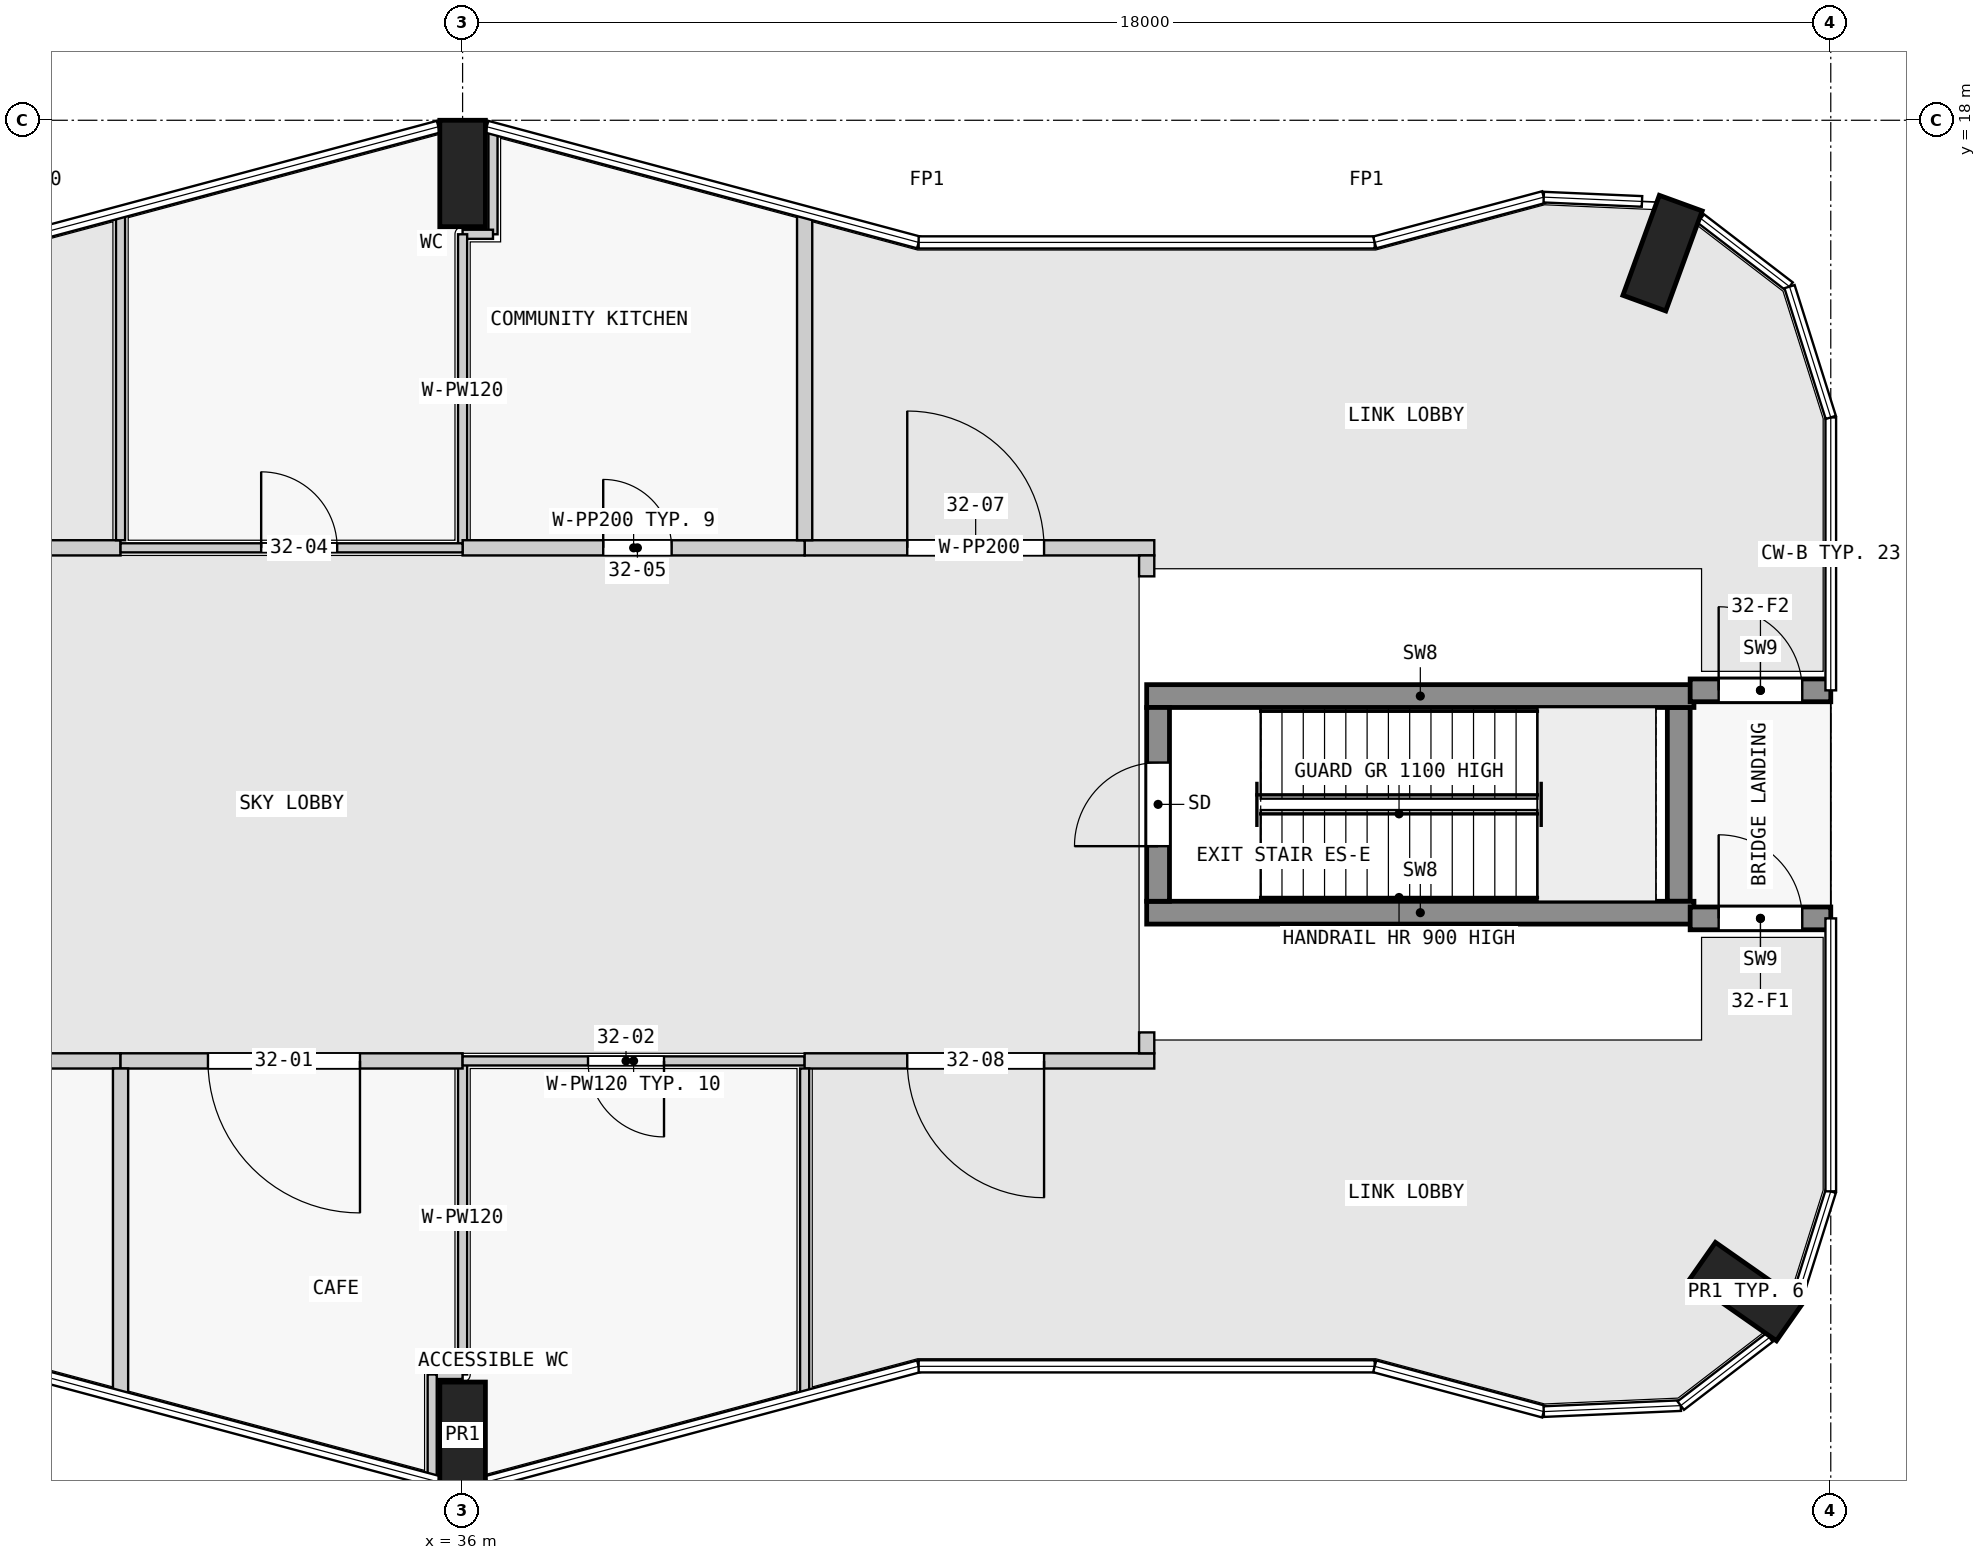
"""IFC4 building model, lengths in metres.
Left out: names, types, materials, properties, quantities, classifications, styles, units other than length and angle.
Written with IfcOpenShell. Run it as: python <this file> out.ifc"""

import sys

from ifc_helpers import new_model, si_unit, direction, frame, frame_2d, origin, origin_2d, place, context, subcontext, project, spatial, rectangle, extrude, element, fill, save


model = new_model("IFC4")
c1 = context("Model", 3, precision=1e-05, world=origin(), true_north=direction((0.0, 1.0)))
c2 = subcontext(c1, "Body", "Model", "MODEL_VIEW")
j1 = project(units=[si_unit("LENGTHUNIT", "METRE"), si_unit("PLANEANGLEUNIT", "RADIAN")], contexts=[c1])
p1 = place(None, origin())
s1 = spatial("IfcSite", under=j1, at=p1, CompositionType="ELEMENT")
p2 = place(p1, origin())
s2 = spatial("IfcBuilding", under=s1, at=p2, CompositionType="ELEMENT")
p3 = place(p2, frame((0.0, 0.0, 123.8)))
s3 = spatial("IfcBuildingStorey", under=s2, at=p3, CompositionType="ELEMENT", Elevation=123.8)
for number, where, z_axis, x_axis in (
    (1, (36.0, 0.7, 0.0), (0.0, 0.0, 1.0), (1.0, 0.0, 0.0)),
    (2, (52.884, 2.59, 0.0), (0.0, 0.0, 1.0), (0.574, 0.819, 0.0)),
    (3, (51.787, 16.252, 0.0), (0.0, 0.0, 1.0), (-0.94, 0.342, 0.0)),
    (4, (36.0, 17.3, 0.0), (0.0, 0.0, 1.0), (1.0, 0.0, 0.0)),
):
    element("IfcColumn", number, at=place(p3, frame(where, z_axis=z_axis, x_axis=x_axis)), inside=s3, PredefinedType="COLUMN", context=c2, shape_type="SweptSolid", body=[
        extrude(rectangle(XDim=0.6, YDim=1.4, at=origin_2d()), origin(), (0.0, 0.0, 1.0), 4.8),
    ])
p4 = place(p3, frame((45.15, 7.725, 0.0), z_axis=(0.0, 0.0, 1.0), x_axis=(0.0, 1.0, 0.0)))
e5 = element("IfcWall", 5, at=p4, inside=s3, PredefinedType="SHEAR", context=c2, shape_type="SweptSolid", body=[
    extrude(rectangle(XDim=2.55, YDim=0.3, at=frame_2d((1.275, 0.0))), origin(), (0.0, 0.0, 1.0), 4.8),
])
p5 = place(p4, frame((0.725, 0.0, 0.0)))
e6 = element("IfcOpeningElement", 6, at=p5, cuts=e5, PredefinedType="OPENING", context=c2, shape_type="SweptSolid", body=[
    extrude(rectangle(XDim=1.1, YDim=2.1, at=frame_2d((0.55, 1.05))), frame((0.0, 0.16, 0.0), z_axis=(0.0, -1.0, 0.0), x_axis=(1.0, 0.0, 0.0)), (0.0, 0.0, 1.0), 0.32),
])
p6 = place(p3, frame((52.0, 7.725, 0.0), z_axis=(0.0, 0.0, 1.0), x_axis=(0.0, 1.0, 0.0)))
e7 = element("IfcWall", 7, at=p6, inside=s3, PredefinedType="SHEAR", context=c2, shape_type="SweptSolid", body=[
    extrude(rectangle(XDim=2.55, YDim=0.3, at=frame_2d((1.275, 0.0))), origin(), (0.0, 0.0, 1.0), 4.8),
])
for number, where, z_axis, x_axis in (
    (8, (45.0, 7.575, 0.0), (0.0, 0.0, 1.0), (1.0, 0.0, 0.0)),
    (9, (45.0, 10.425, 0.0), (0.0, 0.0, 1.0), (1.0, 0.0, 0.0)),
):
    element("IfcWall", number, at=place(p3, frame(where, z_axis=z_axis, x_axis=x_axis)), inside=s3, PredefinedType="SHEAR", context=c2, shape_type="SweptSolid", body=[
        extrude(rectangle(XDim=7.2, YDim=0.3, at=frame_2d((3.6, 0.0))), origin(), (0.0, 0.0, 1.0), 4.8),
    ])
p7 = place(p3, frame((52.15, 7.5, -1.55), z_axis=(0.0, 0.0, 1.0), x_axis=(1.0, 0.0, 0.0)))
e10 = element("IfcWall", 10, at=p7, inside=s3, PredefinedType="SHEAR", context=c2, shape_type="SweptSolid", body=[
    extrude(rectangle(XDim=1.85, YDim=0.3, at=frame_2d((0.925, 0.0))), origin(), (0.0, 0.0, 1.0), 6.05),
])
p8 = place(p7, frame((0.375, 0.0, 1.55)))
e11 = element("IfcOpeningElement", 11, at=p8, cuts=e10, PredefinedType="OPENING", context=c2, shape_type="SweptSolid", body=[
    extrude(rectangle(XDim=1.1, YDim=2.1, at=frame_2d((0.55, 1.05))), frame((0.0, 0.16, 0.0), z_axis=(0.0, -1.0, 0.0), x_axis=(1.0, 0.0, 0.0)), (0.0, 0.0, 1.0), 0.32),
])
p9 = place(p3, frame((52.15, 10.5, -1.55), z_axis=(0.0, 0.0, 1.0), x_axis=(1.0, 0.0, 0.0)))
e12 = element("IfcWall", 12, at=p9, inside=s3, PredefinedType="SHEAR", context=c2, shape_type="SweptSolid", body=[
    extrude(rectangle(XDim=1.85, YDim=0.3, at=frame_2d((0.925, 0.0))), origin(), (0.0, 0.0, 1.0), 6.05),
])
p10 = place(p9, frame((0.375, 0.0, 1.55)))
e13 = element("IfcOpeningElement", 13, at=p10, cuts=e12, PredefinedType="OPENING", context=c2, shape_type="SweptSolid", body=[
    extrude(rectangle(XDim=1.1, YDim=2.1, at=frame_2d((0.55, 1.05))), frame((0.0, 0.16, 0.0), z_axis=(0.0, -1.0, 0.0), x_axis=(1.0, 0.0, 0.0)), (0.0, 0.0, 1.0), 0.32),
])
p11 = place(p3, frame((22.5, 12.375, 0.0), z_axis=(0.0, 0.0, 1.0), x_axis=(1.0, 0.0, 0.0)))
e14 = element("IfcWall", 14, at=p11, inside=s3, PredefinedType="PARTITIONING", context=c2, shape_type="SweptSolid", body=[
    extrude(rectangle(XDim=9.0, YDim=0.2, at=frame_2d((4.5, 0.0))), origin(), (0.0, 0.0, 1.0), 4.5),
])
p12 = place(p11, frame((3.85, 0.0, 0.0)))
e15 = element("IfcOpeningElement", 15, at=p12, cuts=e14, PredefinedType="OPENING", context=c2, shape_type="SweptSolid", body=[
    extrude(rectangle(XDim=1.1, YDim=2.1, at=frame_2d((0.55, 1.05))), frame((0.0, 0.11, 0.0), z_axis=(0.0, -1.0, 0.0), x_axis=(1.0, 0.0, 0.0)), (0.0, 0.0, 1.0), 0.22),
])
p13 = place(p3, frame((31.5, 5.625, 0.0), z_axis=(0.0, 0.0, 1.0), x_axis=(-1.0, 0.0, 0.0)))
e16 = element("IfcWall", 16, at=p13, inside=s3, PredefinedType="PARTITIONING", context=c2, shape_type="SweptSolid", body=[
    extrude(rectangle(XDim=9.0, YDim=0.2, at=frame_2d((4.5, 0.0))), origin(), (0.0, 0.0, 1.0), 4.5),
])
p14 = place(p13, frame((3.6, 0.0, 0.0)))
e17 = element("IfcOpeningElement", 17, at=p14, cuts=e16, PredefinedType="OPENING", context=c2, shape_type="SweptSolid", body=[
    extrude(rectangle(XDim=1.8, YDim=2.1, at=frame_2d((0.9, 1.05))), frame((0.0, 0.11, 0.0), z_axis=(0.0, -1.0, 0.0), x_axis=(1.0, 0.0, 0.0)), (0.0, 0.0, 1.0), 0.22),
])
p15 = place(p3, frame((36.0, 5.625, 0.0), z_axis=(0.0, 0.0, 1.0), x_axis=(0.0, -1.0, 0.0)))
e18 = element("IfcWall", 18, at=p15, inside=s3, PredefinedType="PARTITIONING", context=c2, shape_type="SweptSolid", body=[
    extrude(rectangle(XDim=4.125, YDim=0.12, at=frame_2d((2.062, 0.0))), origin(), (0.0, 0.0, 1.0), 4.5),
])
p16 = place(p3, frame((36.0, 1.5, 0.0), z_axis=(0.0, 0.0, 1.0), x_axis=(-1.0, 0.0, 0.0)))
e19 = element("IfcWall", 19, at=p16, inside=s3, PredefinedType="PARTITIONING", context=c2, shape_type="SweptSolid", body=[
    extrude(rectangle(XDim=0.4, YDim=0.12, at=frame_2d((0.2, 0.0))), origin(), (0.0, 0.0, 1.0), 4.5),
])
for number, where, z_axis, x_axis in (
    (20, (35.6, 1.5, 0.0), (0.0, 0.0, 1.0), (0.0, -1.0, 0.0)),
    (21, (36.4, 17.893, 0.0), (0.0, 0.0, 1.0), (0.0, -1.0, 0.0)),
):
    element("IfcWall", number, at=place(p3, frame(where, z_axis=z_axis, x_axis=x_axis)), inside=s3, PredefinedType="PARTITIONING", context=c2, shape_type="SweptSolid", body=[
        extrude(rectangle(XDim=1.393, YDim=0.12, at=frame_2d((0.697, 0.0))), origin(), (0.0, 0.0, 1.0), 4.5),
    ])
p17 = place(p3, frame((36.4, 16.5, 0.0), z_axis=(0.0, 0.0, 1.0), x_axis=(-1.0, 0.0, 0.0)))
e22 = element("IfcWall", 22, at=p17, inside=s3, PredefinedType="PARTITIONING", context=c2, shape_type="SweptSolid", body=[
    extrude(rectangle(XDim=0.4, YDim=0.12, at=frame_2d((0.2, 0.0))), origin(), (0.0, 0.0, 1.0), 4.5),
])
p18 = place(p3, frame((36.0, 16.5, 0.0), z_axis=(0.0, 0.0, 1.0), x_axis=(0.0, -1.0, 0.0)))
e23 = element("IfcWall", 23, at=p18, inside=s3, PredefinedType="PARTITIONING", context=c2, shape_type="SweptSolid", body=[
    extrude(rectangle(XDim=4.125, YDim=0.12, at=frame_2d((2.062, 0.0))), origin(), (0.0, 0.0, 1.0), 4.5),
])
p19 = place(p3, frame((40.5, 12.375, 0.0), z_axis=(0.0, 0.0, 1.0), x_axis=(1.0, 0.0, 0.0)))
e24 = element("IfcWall", 24, at=p19, inside=s3, PredefinedType="PARTITIONING", context=c2, shape_type="SweptSolid", body=[
    extrude(rectangle(XDim=4.6, YDim=0.2, at=frame_2d((2.3, 0.0))), origin(), (0.0, 0.0, 1.0), 4.5),
])
p20 = place(p19, frame((1.35, 0.0, 0.0)))
e25 = element("IfcOpeningElement", 25, at=p20, cuts=e24, PredefinedType="OPENING", context=c2, shape_type="SweptSolid", body=[
    extrude(rectangle(XDim=1.8, YDim=2.1, at=frame_2d((0.9, 1.05))), frame((0.0, 0.11, 0.0), z_axis=(0.0, -1.0, 0.0), x_axis=(1.0, 0.0, 0.0)), (0.0, 0.0, 1.0), 0.22),
])
p21 = place(p3, frame((45.0, 12.275, 0.0), z_axis=(0.0, 0.0, 1.0), x_axis=(0.0, -1.0, 0.0)))
e26 = element("IfcWall", 26, at=p21, inside=s3, PredefinedType="PARTITIONING", context=c2, shape_type="SweptSolid", body=[
    extrude(rectangle(XDim=0.275, YDim=0.2, at=frame_2d((0.137, 0.0))), origin(), (0.0, 0.0, 1.0), 4.5),
])
p22 = place(p3, frame((36.0, 12.375, 0.0), z_axis=(0.0, 0.0, 1.0), x_axis=(1.0, 0.0, 0.0)))
e27 = element("IfcWall", 27, at=p22, inside=s3, PredefinedType="PARTITIONING", context=c2, shape_type="SweptSolid", body=[
    extrude(rectangle(XDim=4.5, YDim=0.2, at=frame_2d((2.25, 0.0))), origin(), (0.0, 0.0, 1.0), 4.5),
])
p23 = place(p22, frame((1.85, 0.0, 0.0)))
e28 = element("IfcOpeningElement", 28, at=p23, cuts=e27, PredefinedType="OPENING", context=c2, shape_type="SweptSolid", body=[
    extrude(rectangle(XDim=0.9, YDim=2.1, at=frame_2d((0.45, 1.05))), frame((0.0, 0.11, 0.0), z_axis=(0.0, -1.0, 0.0), x_axis=(1.0, 0.0, 0.0)), (0.0, 0.0, 1.0), 0.22),
])
p24 = place(p3, frame((36.0, 5.625, 0.0), z_axis=(0.0, 0.0, 1.0), x_axis=(-1.0, 0.0, 0.0)))
e29 = element("IfcWall", 29, at=p24, inside=s3, PredefinedType="PARTITIONING", context=c2, shape_type="SweptSolid", body=[
    extrude(rectangle(XDim=4.5, YDim=0.2, at=frame_2d((2.25, 0.0))), origin(), (0.0, 0.0, 1.0), 4.5),
])
p25 = place(p24, frame((1.35, 0.0, 0.0)))
e30 = element("IfcOpeningElement", 30, at=p25, cuts=e29, PredefinedType="OPENING", context=c2, shape_type="SweptSolid", body=[
    extrude(rectangle(XDim=2.0, YDim=2.4, at=frame_2d((1.0, 1.2))), frame((0.0, 0.11, 0.0), z_axis=(0.0, -1.0, 0.0), x_axis=(1.0, 0.0, 0.0)), (0.0, 0.0, 1.0), 0.22),
])
p26 = place(p3, frame((40.5, 5.625, 0.0), z_axis=(0.0, 0.0, 1.0), x_axis=(-1.0, 0.0, 0.0)))
e31 = element("IfcWall", 31, at=p26, inside=s3, PredefinedType="PARTITIONING", context=c2, shape_type="SweptSolid", body=[
    extrude(rectangle(XDim=4.5, YDim=0.12, at=frame_2d((2.25, 0.0))), origin(), (0.0, 0.0, 1.0), 4.5),
])
p27 = place(p26, frame((1.85, 0.0, 0.0)))
e32 = element("IfcOpeningElement", 32, at=p27, cuts=e31, PredefinedType="OPENING", context=c2, shape_type="SweptSolid", body=[
    extrude(rectangle(XDim=1.0, YDim=2.1, at=frame_2d((0.5, 1.05))), frame((0.0, 0.07, 0.0), z_axis=(0.0, -1.0, 0.0), x_axis=(1.0, 0.0, 0.0)), (0.0, 0.0, 1.0), 0.14),
])
p28 = place(p3, frame((31.5, 12.375, 0.0), z_axis=(0.0, 0.0, 1.0), x_axis=(1.0, 0.0, 0.0)))
e33 = element("IfcWall", 33, at=p28, inside=s3, PredefinedType="PARTITIONING", context=c2, shape_type="SweptSolid", body=[
    extrude(rectangle(XDim=4.5, YDim=0.12, at=frame_2d((2.25, 0.0))), origin(), (0.0, 0.0, 1.0), 4.5),
])
p29 = place(p28, frame((1.85, 0.0, 0.0)))
e34 = element("IfcOpeningElement", 34, at=p29, cuts=e33, PredefinedType="OPENING", context=c2, shape_type="SweptSolid", body=[
    extrude(rectangle(XDim=1.0, YDim=2.1, at=frame_2d((0.5, 1.05))), frame((0.0, 0.07, 0.0), z_axis=(0.0, -1.0, 0.0), x_axis=(1.0, 0.0, 0.0)), (0.0, 0.0, 1.0), 0.14),
])
p30 = place(p3, frame((45.1, 5.625, 0.0), z_axis=(0.0, 0.0, 1.0), x_axis=(-1.0, 0.0, 0.0)))
e35 = element("IfcWall", 35, at=p30, inside=s3, PredefinedType="PARTITIONING", context=c2, shape_type="SweptSolid", body=[
    extrude(rectangle(XDim=4.6, YDim=0.2, at=frame_2d((2.3, 0.0))), origin(), (0.0, 0.0, 1.0), 4.5),
])
p31 = place(p30, frame((1.45, 0.0, 0.0)))
e36 = element("IfcOpeningElement", 36, at=p31, cuts=e35, PredefinedType="OPENING", context=c2, shape_type="SweptSolid", body=[
    extrude(rectangle(XDim=1.8, YDim=2.1, at=frame_2d((0.9, 1.05))), frame((0.0, 0.11, 0.0), z_axis=(0.0, -1.0, 0.0), x_axis=(1.0, 0.0, 0.0)), (0.0, 0.0, 1.0), 0.22),
])
p32 = place(p3, frame((40.5, 16.795, 0.0), z_axis=(0.0, 0.0, 1.0), x_axis=(0.0, -1.0, 0.0)))
e37 = element("IfcWall", 37, at=p32, inside=s3, PredefinedType="PARTITIONING", context=c2, shape_type="SweptSolid", body=[
    extrude(rectangle(XDim=4.32, YDim=0.2, at=frame_2d((2.16, 0.0))), origin(), (0.0, 0.0, 1.0), 4.5),
])
for number, where, z_axis, x_axis in (
    (38, (40.5, 5.525, 0.0), (0.0, 0.0, 1.0), (0.0, -1.0, 0.0)),
    (39, (31.5, 16.795, 0.0), (0.0, 0.0, 1.0), (0.0, -1.0, 0.0)),
):
    element("IfcWall", number, at=place(p3, frame(where, z_axis=z_axis, x_axis=x_axis)), inside=s3, PredefinedType="PARTITIONING", context=c2, shape_type="SweptSolid", body=[
        extrude(rectangle(XDim=4.32, YDim=0.12, at=frame_2d((2.16, 0.0))), origin(), (0.0, 0.0, 1.0), 4.5),
    ])
p33 = place(p3, frame((31.5, 5.525, 0.0), z_axis=(0.0, 0.0, 1.0), x_axis=(0.0, -1.0, 0.0)))
e40 = element("IfcWall", 40, at=p33, inside=s3, PredefinedType="PARTITIONING", context=c2, shape_type="SweptSolid", body=[
    extrude(rectangle(XDim=4.32, YDim=0.2, at=frame_2d((2.16, 0.0))), origin(), (0.0, 0.0, 1.0), 4.5),
])
p34 = place(p3, frame((45.0, 6.0, 0.0), z_axis=(0.0, 0.0, 1.0), x_axis=(0.0, -1.0, 0.0)))
e41 = element("IfcWall", 41, at=p34, inside=s3, PredefinedType="PARTITIONING", context=c2, shape_type="SweptSolid", body=[
    extrude(rectangle(XDim=0.275, YDim=0.2, at=frame_2d((0.137, 0.0))), origin(), (0.0, 0.0, 1.0), 4.5),
])
p35 = place(p5, origin())
e42 = element("IfcDoor", 42, at=p35, inside=s3, OperationType="SINGLE_SWING_LEFT", PredefinedType="DOOR", context=c2, shape_type="SweptSolid", body=[
    extrude(rectangle(XDim=1.1, YDim=2.1, at=frame_2d((0.55, 1.05))), frame((0.0, 0.025, 0.0), z_axis=(0.0, -1.0, 0.0), x_axis=(1.0, 0.0, 0.0)), (0.0, 0.0, 1.0), 0.05),
])
fill(e6, e42)
p36 = place(p25, origin())
e43 = element("IfcDoor", 43, at=p36, inside=s3, OperationType="SINGLE_SWING_LEFT", PredefinedType="DOOR", context=c2, shape_type="SweptSolid", body=[
    extrude(rectangle(XDim=2.0, YDim=2.4, at=frame_2d((1.0, 1.2))), frame((0.0, 0.025, 0.0), z_axis=(0.0, -1.0, 0.0), x_axis=(1.0, 0.0, 0.0)), (0.0, 0.0, 1.0), 0.05),
])
fill(e30, e43)
p37 = place(p27, origin())
e44 = element("IfcDoor", 44, at=p37, inside=s3, OperationType="SINGLE_SWING_LEFT", PredefinedType="DOOR", context=c2, shape_type="SweptSolid", body=[
    extrude(rectangle(XDim=1.0, YDim=2.1, at=frame_2d((0.5, 1.05))), frame((0.0, 0.025, 0.0), z_axis=(0.0, -1.0, 0.0), x_axis=(1.0, 0.0, 0.0)), (0.0, 0.0, 1.0), 0.05),
])
fill(e32, e44)
p38 = place(p29, origin())
e45 = element("IfcDoor", 45, at=p38, inside=s3, OperationType="SINGLE_SWING_LEFT", PredefinedType="DOOR", context=c2, shape_type="SweptSolid", body=[
    extrude(rectangle(XDim=1.0, YDim=2.1, at=frame_2d((0.5, 1.05))), frame((0.0, 0.025, 0.0), z_axis=(0.0, -1.0, 0.0), x_axis=(1.0, 0.0, 0.0)), (0.0, 0.0, 1.0), 0.05),
])
fill(e34, e45)
p39 = place(p23, origin())
e46 = element("IfcDoor", 46, at=p39, inside=s3, OperationType="SINGLE_SWING_LEFT", PredefinedType="DOOR", context=c2, shape_type="SweptSolid", body=[
    extrude(rectangle(XDim=0.9, YDim=2.1, at=frame_2d((0.45, 1.05))), frame((0.0, 0.025, 0.0), z_axis=(0.0, -1.0, 0.0), x_axis=(1.0, 0.0, 0.0)), (0.0, 0.0, 1.0), 0.05),
])
fill(e28, e46)
p40 = place(p20, origin())
e47 = element("IfcDoor", 47, at=p40, inside=s3, OperationType="DOUBLE_DOOR_SINGLE_SWING", PredefinedType="DOOR", context=c2, shape_type="SweptSolid", body=[
    extrude(rectangle(XDim=1.8, YDim=2.1, at=frame_2d((0.9, 1.05))), frame((0.0, 0.025, 0.0), z_axis=(0.0, -1.0, 0.0), x_axis=(1.0, 0.0, 0.0)), (0.0, 0.0, 1.0), 0.05),
])
fill(e25, e47)
p41 = place(p31, origin())
e48 = element("IfcDoor", 48, at=p41, inside=s3, OperationType="DOUBLE_DOOR_SINGLE_SWING", PredefinedType="DOOR", context=c2, shape_type="SweptSolid", body=[
    extrude(rectangle(XDim=1.8, YDim=2.1, at=frame_2d((0.9, 1.05))), frame((0.0, 0.025, 0.0), z_axis=(0.0, -1.0, 0.0), x_axis=(1.0, 0.0, 0.0)), (0.0, 0.0, 1.0), 0.05),
])
fill(e36, e48)
p42 = place(p8, origin())
e49 = element("IfcDoor", 49, at=p42, inside=s3, OperationType="SINGLE_SWING_LEFT", PredefinedType="DOOR", context=c2, shape_type="SweptSolid", body=[
    extrude(rectangle(XDim=1.1, YDim=2.1, at=frame_2d((0.55, 1.05))), frame((0.0, 0.025, 0.0), z_axis=(0.0, -1.0, 0.0), x_axis=(1.0, 0.0, 0.0)), (0.0, 0.0, 1.0), 0.05),
])
fill(e11, e49)
p43 = place(p10, origin())
e50 = element("IfcDoor", 50, at=p43, inside=s3, OperationType="SINGLE_SWING_LEFT", PredefinedType="DOOR", context=c2, shape_type="SweptSolid", body=[
    extrude(rectangle(XDim=1.1, YDim=2.1, at=frame_2d((0.55, 1.05))), frame((0.0, 0.025, 0.0), z_axis=(0.0, -1.0, 0.0), x_axis=(1.0, 0.0, 0.0)), (0.0, 0.0, 1.0), 0.05),
])
fill(e13, e50)
save(model, sys.argv[1])
